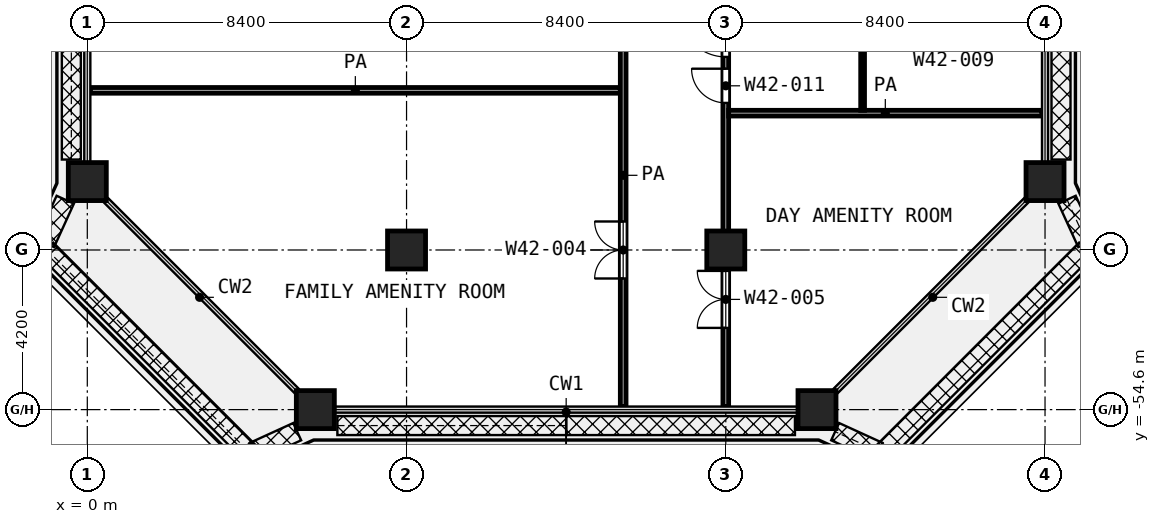
"""IFC4 building model, lengths in metres.
Left out: names, types, materials, properties, quantities, classifications, styles, units other than length and angle.
Written with IfcOpenShell. Run it as: python <this file> out.ifc"""

import sys

from ifc_helpers import new_model, si_unit, direction, frame, frame_2d, origin, origin_2d, place, context, subcontext, project, spatial, rectangle, extrude, element, fill, save


model = new_model("IFC4")
c1 = context("Model", 3, precision=1e-05, world=origin(), true_north=direction((0.0, 1.0)))
c2 = subcontext(c1, "Body", "Model", "MODEL_VIEW")
j1 = project(units=[si_unit("LENGTHUNIT", "METRE"), si_unit("PLANEANGLEUNIT", "RADIAN")], contexts=[c1])
p1 = place(None, origin())
s1 = spatial("IfcSite", under=j1, at=p1, CompositionType="ELEMENT")
p2 = place(p1, origin())
s2 = spatial("IfcBuilding", under=s1, at=p2, CompositionType="ELEMENT")
p3 = place(p2, frame((0.0, 0.0, 204.6)))
s3 = spatial("IfcBuildingStorey", under=s2, at=p3, CompositionType="ELEMENT", Elevation=204.6)
for number, where, z_axis, x_axis in (
    (1, (0.0, -48.6, 0.0), (0.0, 0.0, 1.0), (1.0, 0.0, 0.0)),
    (2, (25.2, -48.6, 0.0), (0.0, 0.0, 1.0), (1.0, 0.0, 0.0)),
    (3, (8.4, -50.4, 0.0), (0.0, 0.0, 1.0), (1.0, 0.0, 0.0)),
    (4, (16.8, -50.4, 0.0), (0.0, 0.0, 1.0), (1.0, 0.0, 0.0)),
    (5, (6.0, -54.6, 0.0), (0.0, 0.0, 1.0), (1.0, 0.0, 0.0)),
    (6, (19.2, -54.6, 0.0), (0.0, 0.0, 1.0), (1.0, 0.0, 0.0)),
):
    element("IfcColumn", number, at=place(p3, frame(where, z_axis=z_axis, x_axis=x_axis)), inside=s3, PredefinedType="COLUMN", context=c2, shape_type="SweptSolid", body=[
        extrude(rectangle(XDim=1.0, YDim=1.0, at=origin_2d()), origin(), (0.0, 0.0, 1.0), 4.2),
    ])
p4 = place(p3, frame((20.4, -46.725, 0.0), z_axis=(0.0, 0.0, 1.0), x_axis=(0.0, 1.0, 0.0)))
e7 = element("IfcWall", 7, at=p4, inside=s3, PredefinedType="PARTITIONING", context=c2, shape_type="SweptSolid", body=[
    extrude(rectangle(XDim=8.85, YDim=0.1, at=frame_2d((4.425, 0.0))), origin(), (0.0, 0.0, 1.0), 3.6),
])
p5 = place(p4, frame((2.875, 0.0, 0.0)))
e8 = element("IfcOpeningElement", 8, at=p5, cuts=e7, PredefinedType="OPENING", context=c2, shape_type="SweptSolid", body=[
    extrude(rectangle(XDim=1.0, YDim=2.1, at=frame_2d((0.5, 1.05))), frame((0.0, 0.06, 0.0), z_axis=(0.0, -1.0, 0.0), x_axis=(1.0, 0.0, 0.0)), (0.0, 0.0, 1.0), 0.12),
])
p6 = place(p3, frame((16.875, -46.8, 0.0), z_axis=(0.0, 0.0, 1.0), x_axis=(1.0, 0.0, 0.0)))
e9 = element("IfcWall", 9, at=p6, inside=s3, PredefinedType="PARTITIONING", context=c2, shape_type="SweptSolid", body=[
    extrude(rectangle(XDim=8.245, YDim=0.15, at=frame_2d((4.123, 0.0))), origin(), (0.0, 0.0, 1.0), 3.6),
])
p7 = place(p3, frame((0.08, -46.2, 0.0), z_axis=(0.0, 0.0, 1.0), x_axis=(1.0, 0.0, 0.0)))
e10 = element("IfcWall", 10, at=p7, inside=s3, PredefinedType="PARTITIONING", context=c2, shape_type="SweptSolid", body=[
    extrude(rectangle(XDim=13.945, YDim=0.15, at=frame_2d((6.972, 0.0))), origin(), (0.0, 0.0, 1.0), 3.6),
])
p8 = place(p3, frame((14.1, -54.52, 0.0), z_axis=(0.0, 0.0, 1.0), x_axis=(0.0, 1.0, 0.0)))
e11 = element("IfcWall", 11, at=p8, inside=s3, PredefinedType="PARTITIONING", context=c2, shape_type="SweptSolid", body=[
    extrude(rectangle(XDim=12.17, YDim=0.15, at=frame_2d((6.085, 0.0))), origin(), (0.0, 0.0, 1.0), 3.6),
])
p9 = place(p8, frame((3.37, 0.0, 0.0)))
e12 = element("IfcOpeningElement", 12, at=p9, cuts=e11, PredefinedType="OPENING", context=c2, shape_type="SweptSolid", body=[
    extrude(rectangle(XDim=1.5, YDim=2.1, at=frame_2d((0.75, 1.05))), frame((0.0, 0.085, 0.0), z_axis=(0.0, -1.0, 0.0), x_axis=(1.0, 0.0, 0.0)), (0.0, 0.0, 1.0), 0.17),
])
p10 = place(p3, frame((16.8, -54.52, 0.0), z_axis=(0.0, 0.0, 1.0), x_axis=(0.0, 1.0, 0.0)))
e13 = element("IfcWall", 13, at=p10, inside=s3, PredefinedType="PARTITIONING", context=c2, shape_type="SweptSolid", body=[
    extrude(rectangle(XDim=29.62, YDim=0.15, at=frame_2d((14.81, 0.0))), origin(), (0.0, 0.0, 1.0), 3.6),
])
p11 = place(p10, frame((21.52, 0.0, 0.0)))
e14 = element("IfcOpeningElement", 14, at=p11, cuts=e13, PredefinedType="OPENING", context=c2, shape_type="SweptSolid", body=[
    extrude(rectangle(XDim=1.2, YDim=2.1, at=frame_2d((0.6, 1.05))), frame((0.0, 0.085, 0.0), z_axis=(0.0, -1.0, 0.0), x_axis=(1.0, 0.0, 0.0)), (0.0, 0.0, 1.0), 0.17),
])
p12 = place(p10, frame((10.76, 0.0, 0.0)))
e15 = element("IfcOpeningElement", 15, at=p12, cuts=e13, PredefinedType="OPENING", context=c2, shape_type="SweptSolid", body=[
    extrude(rectangle(XDim=1.2, YDim=2.1, at=frame_2d((0.6, 1.05))), frame((0.0, 0.085, 0.0), z_axis=(0.0, -1.0, 0.0), x_axis=(1.0, 0.0, 0.0)), (0.0, 0.0, 1.0), 0.17),
])
p13 = place(p10, frame((9.2, 0.0, 0.0)))
e16 = element("IfcOpeningElement", 16, at=p13, cuts=e13, PredefinedType="OPENING", context=c2, shape_type="SweptSolid", body=[
    extrude(rectangle(XDim=1.2, YDim=2.1, at=frame_2d((0.6, 1.05))), frame((0.0, 0.085, 0.0), z_axis=(0.0, -1.0, 0.0), x_axis=(1.0, 0.0, 0.0)), (0.0, 0.0, 1.0), 0.17),
])
p14 = place(p10, frame((7.99, 0.0, 0.0)))
e17 = element("IfcOpeningElement", 17, at=p14, cuts=e13, PredefinedType="OPENING", context=c2, shape_type="SweptSolid", body=[
    extrude(rectangle(XDim=0.9, YDim=2.1, at=frame_2d((0.45, 1.05))), frame((0.0, 0.085, 0.0), z_axis=(0.0, -1.0, 0.0), x_axis=(1.0, 0.0, 0.0)), (0.0, 0.0, 1.0), 0.17),
])
p15 = place(p10, frame((2.07, 0.0, 0.0)))
e18 = element("IfcOpeningElement", 18, at=p15, cuts=e13, PredefinedType="OPENING", context=c2, shape_type="SweptSolid", body=[
    extrude(rectangle(XDim=1.5, YDim=2.1, at=frame_2d((0.75, 1.05))), frame((0.0, 0.085, 0.0), z_axis=(0.0, -1.0, 0.0), x_axis=(1.0, 0.0, 0.0)), (0.0, 0.0, 1.0), 0.17),
])
p16 = place(p9, origin())
e19 = element("IfcDoor", 19, at=p16, inside=s3, OperationType="DOUBLE_DOOR_SINGLE_SWING", PredefinedType="DOOR", context=c2, shape_type="SweptSolid", body=[
    extrude(rectangle(XDim=1.5, YDim=2.1, at=frame_2d((0.75, 1.05))), frame((0.0, 0.025, 0.0), z_axis=(0.0, -1.0, 0.0), x_axis=(1.0, 0.0, 0.0)), (0.0, 0.0, 1.0), 0.05),
])
fill(e12, e19)
p17 = place(p13, origin())
e20 = element("IfcDoor", 20, at=p17, inside=s3, OperationType="SINGLE_SWING_RIGHT", PredefinedType="DOOR", context=c2, shape_type="SweptSolid", body=[
    extrude(rectangle(XDim=1.2, YDim=2.1, at=frame_2d((0.6, 1.05))), frame((0.0, 0.025, 0.0), z_axis=(0.0, -1.0, 0.0), x_axis=(1.0, 0.0, 0.0)), (0.0, 0.0, 1.0), 0.05),
])
fill(e16, e20)
p18 = place(p14, origin())
e21 = element("IfcDoor", 21, at=p18, inside=s3, OperationType="SINGLE_SWING_RIGHT", PredefinedType="DOOR", context=c2, shape_type="SweptSolid", body=[
    extrude(rectangle(XDim=0.9, YDim=2.1, at=frame_2d((0.45, 1.05))), frame((0.0, 0.025, 0.0), z_axis=(0.0, -1.0, 0.0), x_axis=(1.0, 0.0, 0.0)), (0.0, 0.0, 1.0), 0.05),
])
fill(e17, e21)
p19 = place(p15, origin())
e22 = element("IfcDoor", 22, at=p19, inside=s3, OperationType="DOUBLE_DOOR_SINGLE_SWING", PredefinedType="DOOR", context=c2, shape_type="SweptSolid", body=[
    extrude(rectangle(XDim=1.5, YDim=2.1, at=frame_2d((0.75, 1.05))), frame((0.0, 0.025, 0.0), z_axis=(0.0, -1.0, 0.0), x_axis=(1.0, 0.0, 0.0)), (0.0, 0.0, 1.0), 0.05),
])
fill(e18, e22)
save(model, sys.argv[1])
